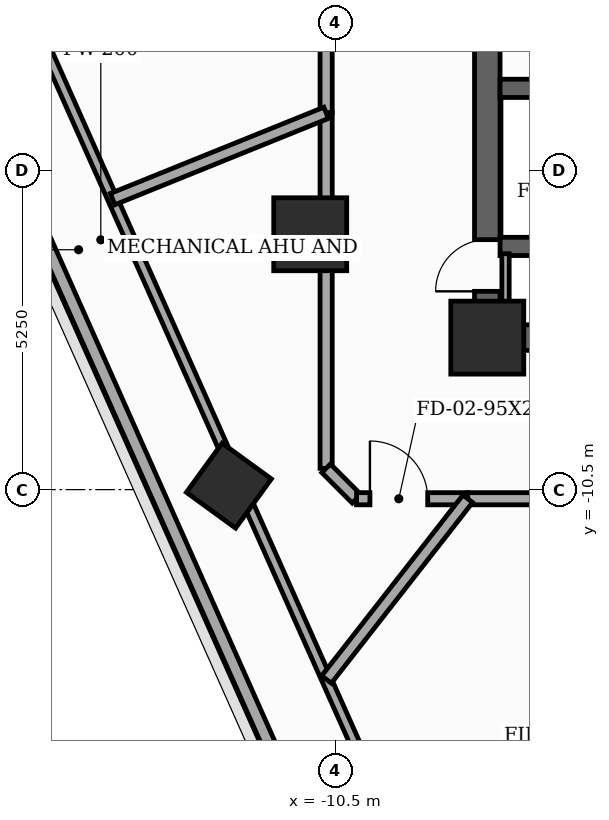
"""IFC4 building model, lengths in metres.
Left out: names, types, materials, properties, quantities, classifications, styles, units other than length and angle.
Written with IfcOpenShell. Run it as: python <this file> out.ifc"""

import sys

from ifc_helpers import new_model, si_unit, direction, frame, frame_2d, origin, origin_2d, place, context, subcontext, project, spatial, rectangle, extrude, element, fill, save


model = new_model("IFC4")
c1 = context("Model", 3, precision=1e-05, world=origin(), true_north=direction((0.0, 1.0)))
c2 = subcontext(c1, "Body", "Model", "MODEL_VIEW")
j1 = project(units=[si_unit("LENGTHUNIT", "METRE"), si_unit("PLANEANGLEUNIT", "RADIAN")], contexts=[c1])
p1 = place(None, origin())
s1 = spatial("IfcSite", under=j1, at=p1, CompositionType="ELEMENT")
p2 = place(p1, origin())
s2 = spatial("IfcBuilding", under=s1, at=p2, CompositionType="ELEMENT")
p3 = place(p2, frame((0.0, 0.0, 213.8)))
s3 = spatial("IfcBuildingStorey", under=s2, at=p3, CompositionType="ELEMENT", Elevation=213.8)
for number, where, z_axis, x_axis in (
    (1, (-8.0, -8.0, 0.0), (0.0, 0.0, 1.0), (1.0, 0.0, 0.0)),
    (2, (-10.912, -6.3, 0.0), (0.0, 0.0, 1.0), (1.0, 0.0, 0.0)),
):
    element("IfcColumn", number, at=place(p3, frame(where, z_axis=z_axis, x_axis=x_axis)), inside=s3, PredefinedType="COLUMN", context=c2, shape_type="SweptSolid", body=[
        extrude(rectangle(XDim=1.2, YDim=1.2, at=origin_2d()), origin(), (0.0, 0.0, 1.0), 5.1),
    ])
p4 = place(p3, frame((-12.25, -10.435, 0.0), z_axis=(0.0, 0.0, 1.0), x_axis=(0.587785252292, 0.809016994375, 0.0)))
e3 = element("IfcColumn", 3, at=p4, inside=s3, PredefinedType="COLUMN", context=c2, shape_type="SweptSolid", body=[
    extrude(rectangle(XDim=1.0, YDim=1.0, at=origin_2d()), origin(), (0.0, 0.0, 1.0), 5.1),
])
p5 = place(p3, frame((-24.386, 14.046, 0.0), z_axis=(0.0, 0.0, 1.0), x_axis=(0.406737292186, -0.91354516864, 0.0)))
e4 = element("IfcWall", 4, at=p5, inside=s3, PredefinedType="SOLIDWALL", context=c2, shape_type="SweptSolid", body=[
    extrude(rectangle(XDim=45.5, YDim=0.22, at=frame_2d((22.75, 0.0))), origin(), (0.0, 0.0, 1.0), 4.4),
])
p6 = place(p3, frame((-8.0, -8.0, 0.0), z_axis=(0.0, 0.0, 1.0), x_axis=(0.0, 1.0, 0.0)))
e5 = element("IfcWall", 5, at=p6, inside=s3, PredefinedType="SHEAR", context=c2, shape_type="SweptSolid", body=[
    extrude(rectangle(XDim=16.0, YDim=0.42, at=frame_2d((8.0, 0.0))), origin(), (0.0, 0.0, 1.0), 4.9),
])
p7 = place(p6, frame((0.761, 0.0, 0.0)))
e6 = element("IfcOpeningElement", 6, at=p7, cuts=e5, PredefinedType="OPENING", context=c2, shape_type="SweptSolid", body=[
    extrude(rectangle(XDim=0.85, YDim=2.02, at=frame_2d((0.425, 1.01))), frame((0.0, 0.22, 0.0), z_axis=(0.0, -1.0, 0.0), x_axis=(1.0, 0.0, 0.0)), (0.0, 0.0, 1.0), 0.44),
])
p8 = place(p6, frame((5.35, 0.0, 0.0)))
e7 = element("IfcOpeningElement", 7, at=p8, cuts=e5, PredefinedType="OPENING", context=c2, shape_type="SweptSolid", body=[
    extrude(rectangle(XDim=1.05, YDim=2.15, at=frame_2d((0.525, 1.075))), frame((0.0, 0.22, 0.0), z_axis=(0.0, -1.0, 0.0), x_axis=(1.0, 0.0, 0.0)), (0.0, 0.0, 1.0), 0.44),
])
p9 = place(p3, frame((-8.0, -8.0, 0.0), z_axis=(0.0, 0.0, 1.0), x_axis=(1.0, 0.0, 0.0)))
e8 = element("IfcWall", 8, at=p9, inside=s3, PredefinedType="SHEAR", context=c2, shape_type="SweptSolid", body=[
    extrude(rectangle(XDim=16.0, YDim=0.42, at=frame_2d((8.0, 0.0))), origin(), (0.0, 0.0, 1.0), 4.9),
])
p10 = place(p9, frame((7.52, 0.0, 0.0)))
e9 = element("IfcOpeningElement", 9, at=p10, cuts=e8, PredefinedType="OPENING", context=c2, shape_type="SweptSolid", body=[
    extrude(rectangle(XDim=0.95, YDim=2.1, at=frame_2d((0.475, 1.05))), frame((0.0, 0.22, 0.0), z_axis=(0.0, -1.0, 0.0), x_axis=(1.0, 0.0, 0.0)), (0.0, 0.0, 1.0), 0.44),
])
p11 = place(p3, frame((-7.79, -3.9, 0.0), z_axis=(0.0, 0.0, 1.0), x_axis=(1.0, 0.0, 0.0)))
e10 = element("IfcWall", 10, at=p11, inside=s3, PredefinedType="SHEAR", context=c2, shape_type="SweptSolid", body=[
    extrude(rectangle(XDim=3.34, YDim=0.3, at=frame_2d((1.67, 0.0))), origin(), (0.0, 0.0, 1.0), 4.9),
])
p12 = place(p11, frame((1.27, 0.0, 0.0)))
e11 = element("IfcOpeningElement", 11, at=p12, cuts=e10, PredefinedType="OPENING", context=c2, shape_type="SweptSolid", body=[
    extrude(rectangle(XDim=1.1, YDim=2.1, at=frame_2d((0.55, 1.05))), frame((0.0, 0.16, 0.0), z_axis=(0.0, -1.0, 0.0), x_axis=(1.0, 0.0, 0.0)), (0.0, 0.0, 1.0), 0.32),
])
p13 = place(p3, frame((-7.79, -6.5, 0.0), z_axis=(0.0, 0.0, 1.0), x_axis=(1.0, 0.0, 0.0)))
e12 = element("IfcWall", 12, at=p13, inside=s3, PredefinedType="SHEAR", context=c2, shape_type="SweptSolid", body=[
    extrude(rectangle(XDim=3.34, YDim=0.3, at=frame_2d((1.67, 0.0))), origin(), (0.0, 0.0, 1.0), 4.9),
])
p14 = place(p3, frame((-4.768, -26.821, 0.0), z_axis=(0.0, 0.0, 1.0), x_axis=(-0.406738743139, 0.913544522631, 0.0)))
e13 = element("IfcWall", 13, at=p14, inside=s3, PredefinedType="SOLIDWALL", context=c2, shape_type="SweptSolid", body=[
    extrude(rectangle(XDim=45.126, YDim=0.16, at=frame_2d((22.563, 0.0))), origin(), (0.0, 0.0, 1.0), 3.485),
])
p15 = place(p3, frame((-10.65, 1.497, 0.0), z_axis=(0.0, 0.0, 1.0), x_axis=(0.0, -1.0, 0.0)))
e14 = element("IfcWall", 14, at=p15, inside=s3, PredefinedType="SOLIDWALL", context=c2, shape_type="SweptSolid", body=[
    extrude(rectangle(XDim=5.8, YDim=0.2, at=frame_2d((2.9, 0.0))), origin(), (0.0, 0.0, 1.0), 4.285),
])
p16 = place(p15, frame((2.425, 0.0, 0.0)))
e15 = element("IfcOpeningElement", 15, at=p16, cuts=e14, PredefinedType="OPENING", context=c2, shape_type="SweptSolid", body=[
    extrude(rectangle(XDim=0.95, YDim=2.1, at=frame_2d((0.475, 1.05))), frame((0.0, 0.11, 0.0), z_axis=(0.0, -1.0, 0.0), x_axis=(1.0, 0.0, 0.0)), (0.0, 0.0, 1.0), 0.22),
])
p17 = place(p3, frame((-10.65, -4.303, 0.0), z_axis=(0.0, 0.0, 1.0), x_axis=(0.0, -1.0, 0.0)))
e16 = element("IfcWall", 16, at=p17, inside=s3, PredefinedType="SOLIDWALL", context=c2, shape_type="SweptSolid", body=[
    extrude(rectangle(XDim=5.847, YDim=0.2, at=frame_2d((2.923, 0.0))), origin(), (0.0, 0.0, 1.0), 3.485),
])
p18 = place(p3, frame((-10.65, -10.15, 0.0), z_axis=(0.0, 0.0, 1.0), x_axis=(0.707106781187, -0.707106781187, 0.0)))
e17 = element("IfcWall", 17, at=p18, inside=s3, PredefinedType="SOLIDWALL", context=c2, shape_type="SweptSolid", body=[
    extrude(rectangle(XDim=0.707, YDim=0.2, at=frame_2d((0.354, 0.0))), origin(), (0.0, 0.0, 1.0), 4.9),
])
p19 = place(p3, frame((-10.15, -10.65, 0.0), z_axis=(0.0, 0.0, 1.0), x_axis=(1.0, 0.0, 0.0)))
e18 = element("IfcWall", 18, at=p19, inside=s3, PredefinedType="SOLIDWALL", context=c2, shape_type="SweptSolid", body=[
    extrude(rectangle(XDim=1.829, YDim=0.2, at=frame_2d((0.915, 0.0))), origin(), (0.0, 0.0, 1.0), 4.9),
])
p20 = place(p19, frame((0.22, 0.0, 0.0)))
e19 = element("IfcOpeningElement", 19, at=p20, cuts=e18, PredefinedType="OPENING", context=c2, shape_type="SweptSolid", body=[
    extrude(rectangle(XDim=0.95, YDim=2.1, at=frame_2d((0.475, 1.05))), frame((0.0, 0.11, 0.0), z_axis=(0.0, -1.0, 0.0), x_axis=(1.0, 0.0, 0.0)), (0.0, 0.0, 1.0), 0.22),
])
p21 = place(p3, frame((-8.321, -10.65, 0.0), z_axis=(0.0, 0.0, 1.0), x_axis=(1.0, 0.0, 0.0)))
e20 = element("IfcWall", 20, at=p21, inside=s3, PredefinedType="SOLIDWALL", context=c2, shape_type="SweptSolid", body=[
    extrude(rectangle(XDim=6.824, YDim=0.2, at=frame_2d((3.412, 0.0))), origin(), (0.0, 0.0, 1.0), 4.285),
])
p22 = place(p21, frame((4.438, 0.0, 0.0)))
e21 = element("IfcOpeningElement", 21, at=p22, cuts=e20, PredefinedType="OPENING", context=c2, shape_type="SweptSolid", body=[
    extrude(rectangle(XDim=0.95, YDim=2.1, at=frame_2d((0.475, 1.05))), frame((0.0, 0.11, 0.0), z_axis=(0.0, -1.0, 0.0), x_axis=(1.0, 0.0, 0.0)), (0.0, 0.0, 1.0), 0.22),
])
p23 = place(p3, frame((-14.162, -5.722, 0.0), z_axis=(0.0, 0.0, 1.0), x_axis=(0.927191046579, 0.37458879207, 0.0)))
e22 = element("IfcWall", 22, at=p23, inside=s3, PredefinedType="SOLIDWALL", context=c2, shape_type="SweptSolid", body=[
    extrude(rectangle(XDim=3.788, YDim=0.2, at=frame_2d((1.894, 0.0))), origin(), (0.0, 0.0, 1.0), 3.485),
])
p24 = place(p3, frame((-10.644, -13.623, 0.0), z_axis=(0.0, 0.0, 1.0), x_axis=(0.615681711479, 0.787994942973, 0.0)))
e23 = element("IfcWall", 23, at=p24, inside=s3, PredefinedType="SOLIDWALL", context=c2, shape_type="SweptSolid", body=[
    extrude(rectangle(XDim=3.773, YDim=0.2, at=frame_2d((1.886, 0.0))), origin(), (0.0, 0.0, 1.0), 3.485),
])
p25 = place(p3, frame((-7.7, -7.75, 0.0), z_axis=(0.0, 0.0, 1.0), x_axis=(0.0, 1.0, 0.0)))
e24 = element("IfcWall", 24, at=p25, inside=s3, PredefinedType="PLUMBINGWALL", context=c2, shape_type="SweptSolid", body=[
    extrude(rectangle(XDim=1.13, YDim=0.12, at=frame_2d((0.565, 0.0))), origin(), (0.0, 0.0, 1.0), 4.9),
])
p26 = place(p7, origin())
e25 = element("IfcDoor", 25, at=p26, inside=s3, OperationType="SINGLE_SWING_LEFT", PredefinedType="TRAPDOOR", context=c2, shape_type="SweptSolid", body=[
    extrude(rectangle(XDim=0.85, YDim=2.02, at=frame_2d((0.425, 1.01))), frame((0.0, 0.025, 0.0), z_axis=(0.0, -1.0, 0.0), x_axis=(1.0, 0.0, 0.0)), (0.0, 0.0, 1.0), 0.05),
])
fill(e6, e25)
p27 = place(p20, origin())
e26 = element("IfcDoor", 26, at=p27, inside=s3, OperationType="SINGLE_SWING_LEFT", PredefinedType="DOOR", context=c2, shape_type="SweptSolid", body=[
    extrude(rectangle(XDim=0.95, YDim=2.1, at=frame_2d((0.475, 1.05))), frame((0.0, 0.025, 0.0), z_axis=(0.0, -1.0, 0.0), x_axis=(1.0, 0.0, 0.0)), (0.0, 0.0, 1.0), 0.05),
])
fill(e19, e26)
save(model, sys.argv[1])
